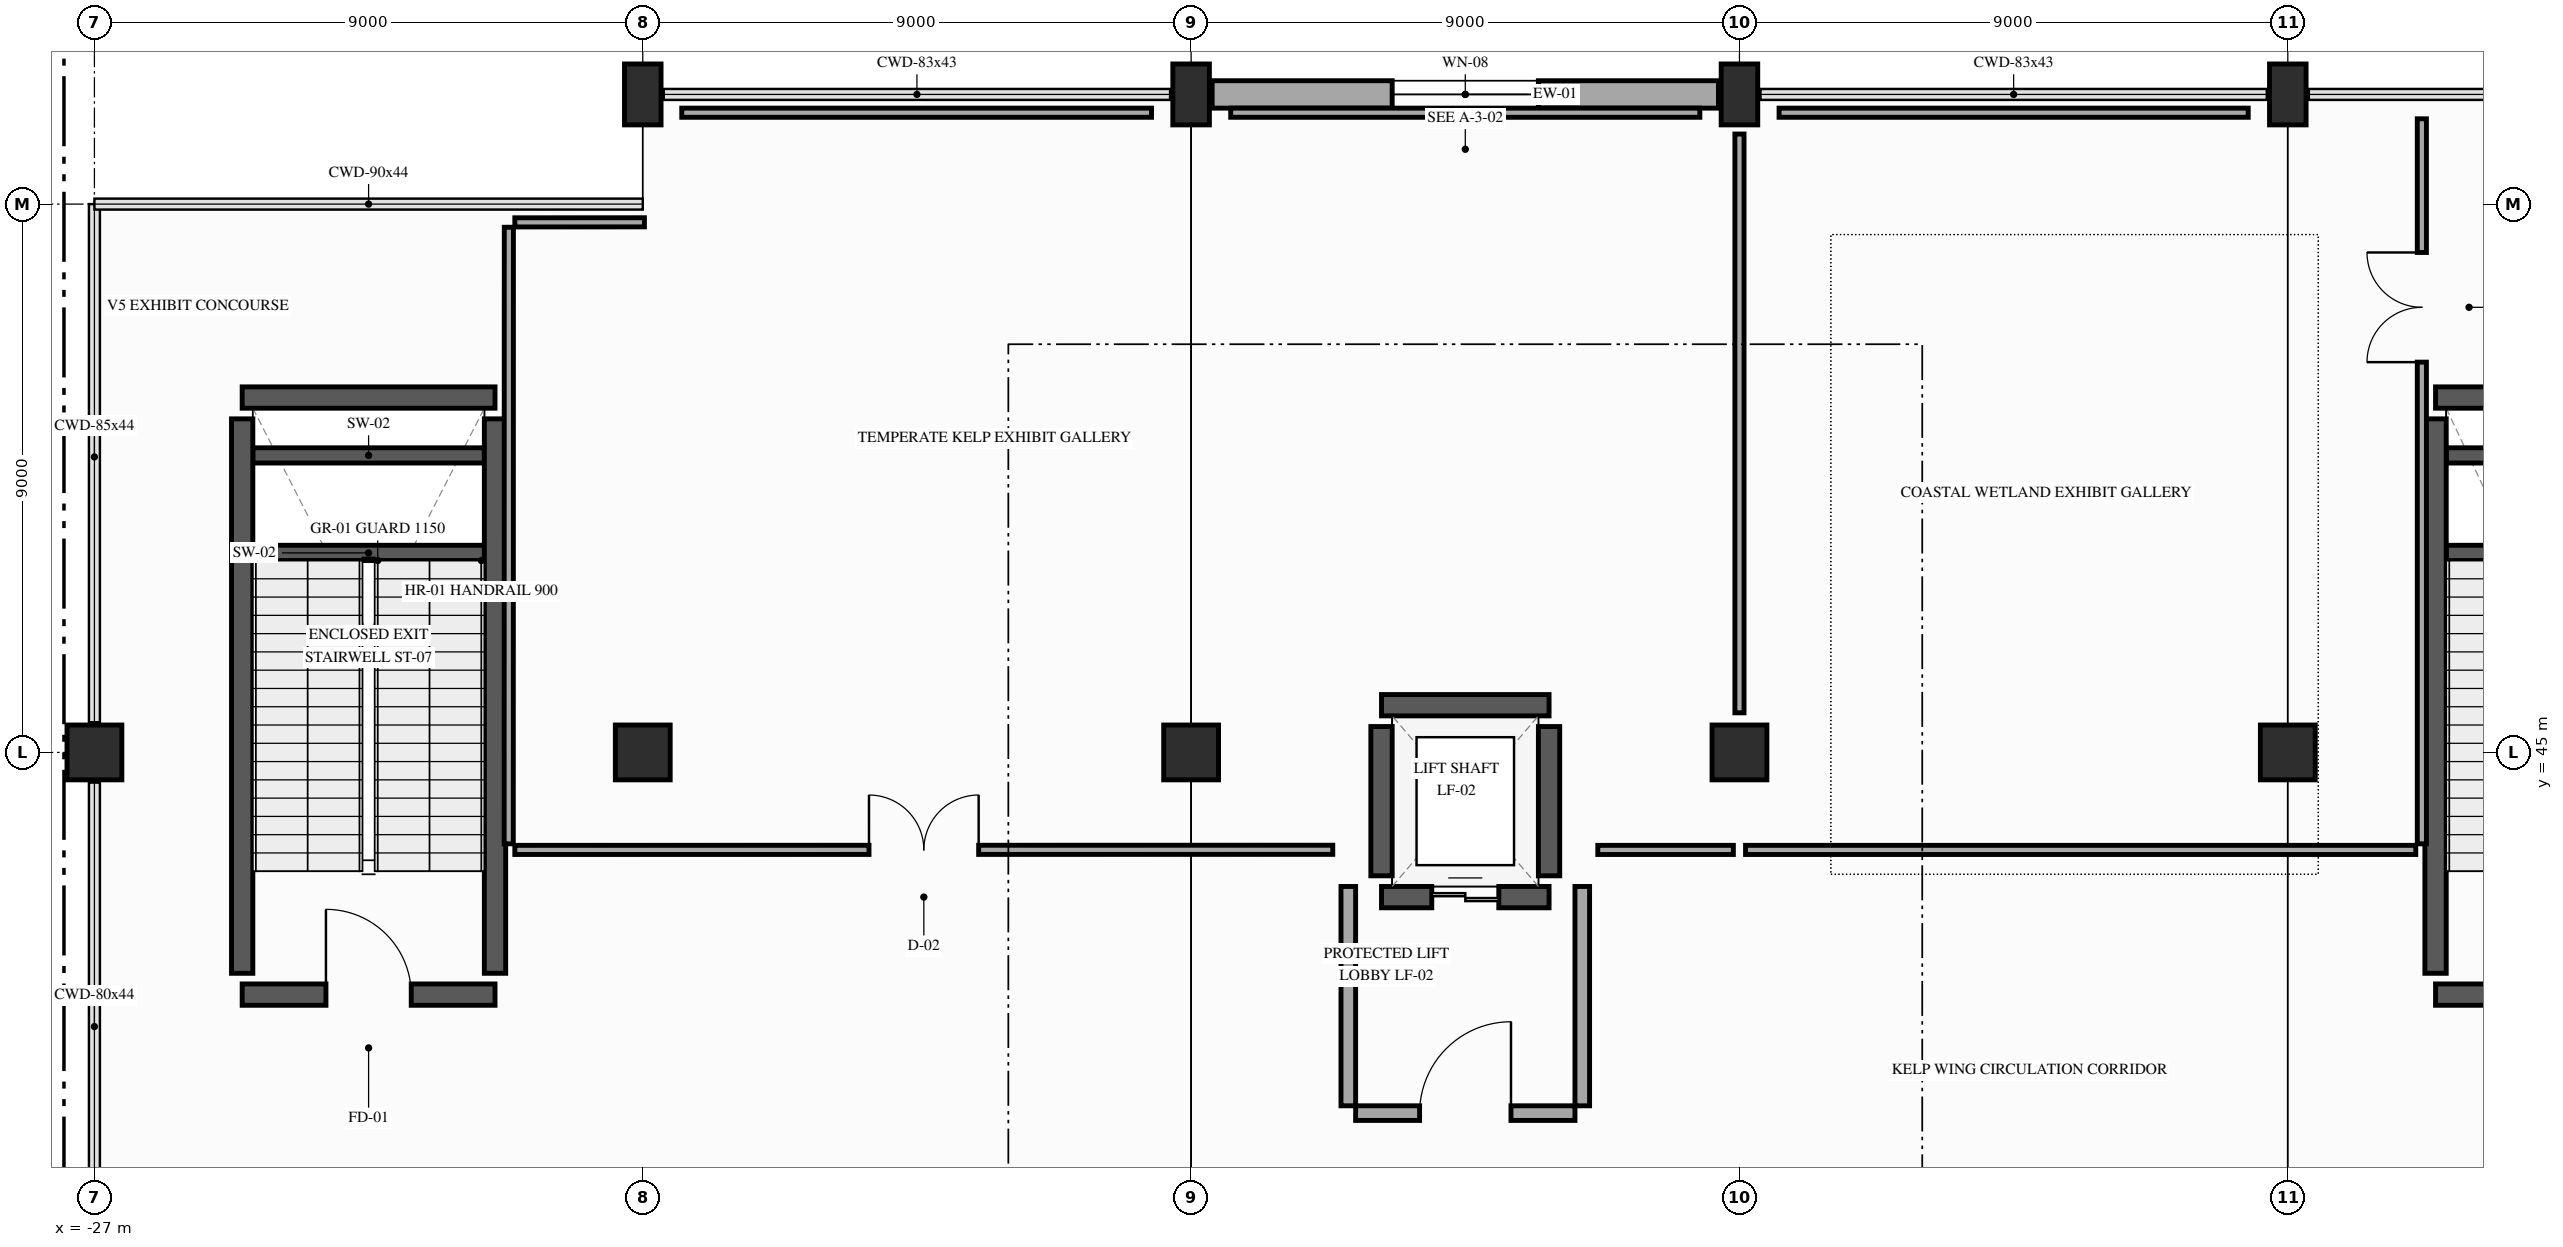
"""IFC4 building model, lengths in metres.
Left out: names, types, materials, properties, quantities, classifications, styles, units other than length and angle.
Written with IfcOpenShell. Run it as: python <this file> out.ifc"""

import sys

from ifc_helpers import new_model, si_unit, direction, frame, frame_2d, origin, origin_2d, place, context, subcontext, project, spatial, rectangle, extrude, element, fill, save


model = new_model("IFC4")
c1 = context("Model", 3, precision=1e-05, world=origin(), true_north=direction((0.0, 1.0)))
c2 = subcontext(c1, "Body", "Model", "MODEL_VIEW")
j1 = project(units=[si_unit("LENGTHUNIT", "METRE"), si_unit("PLANEANGLEUNIT", "RADIAN")], contexts=[c1])
p1 = place(None, origin())
s1 = spatial("IfcSite", under=j1, at=p1, CompositionType="ELEMENT")
p2 = place(p1, origin())
s2 = spatial("IfcBuilding", under=s1, at=p2, CompositionType="ELEMENT")
p3 = place(p2, frame((0.0, 0.0, 5.4)))
s3 = spatial("IfcBuildingStorey", under=s2, at=p3, CompositionType="ELEMENT", Elevation=5.4)
for number, where, z_axis, x_axis in (
    (1, (-27.0, 45.0, 0.0), (0.0, 0.0, 1.0), (1.0, 0.0, 0.0)),
    (2, (-18.0, 45.0, 0.0), (0.0, 0.0, 1.0), (1.0, 0.0, 0.0)),
):
    element("IfcColumn", number, at=place(p3, frame(where, z_axis=z_axis, x_axis=x_axis)), inside=s3, PredefinedType="COLUMN", context=c2, shape_type="SweptSolid", body=[
        extrude(rectangle(XDim=0.9, YDim=0.9, at=origin_2d()), origin(), (0.0, 0.0, 1.0), 5.4),
    ])
p4 = place(p3, frame((-18.0, 55.8, 0.0), z_axis=(0.0, 0.0, 1.0), x_axis=(1.0, 0.0, 0.0)))
e3 = element("IfcColumn", 3, at=p4, inside=s3, PredefinedType="PILASTER", context=c2, shape_type="SweptSolid", body=[
    extrude(rectangle(XDim=0.6, YDim=1.0, at=origin_2d()), origin(), (0.0, 0.0, 1.0), 5.4),
])
p5 = place(p3, frame((-9.0, 45.0, 0.0), z_axis=(0.0, 0.0, 1.0), x_axis=(1.0, 0.0, 0.0)))
e4 = element("IfcColumn", 4, at=p5, inside=s3, PredefinedType="COLUMN", context=c2, shape_type="SweptSolid", body=[
    extrude(rectangle(XDim=0.9, YDim=0.9, at=origin_2d()), origin(), (0.0, 0.0, 1.0), 5.4),
])
p6 = place(p3, frame((-9.0, 55.8, 0.0), z_axis=(0.0, 0.0, 1.0), x_axis=(1.0, 0.0, 0.0)))
e5 = element("IfcColumn", 5, at=p6, inside=s3, PredefinedType="PILASTER", context=c2, shape_type="SweptSolid", body=[
    extrude(rectangle(XDim=0.6, YDim=1.0, at=origin_2d()), origin(), (0.0, 0.0, 1.0), 5.4),
])
p7 = place(p3, frame((0.0, 45.0, 0.0), z_axis=(0.0, 0.0, 1.0), x_axis=(1.0, 0.0, 0.0)))
e6 = element("IfcColumn", 6, at=p7, inside=s3, PredefinedType="COLUMN", context=c2, shape_type="SweptSolid", body=[
    extrude(rectangle(XDim=0.9, YDim=0.9, at=origin_2d()), origin(), (0.0, 0.0, 1.0), 5.4),
])
p8 = place(p3, frame((0.0, 55.8, 0.0), z_axis=(0.0, 0.0, 1.0), x_axis=(1.0, 0.0, 0.0)))
e7 = element("IfcColumn", 7, at=p8, inside=s3, PredefinedType="PILASTER", context=c2, shape_type="SweptSolid", body=[
    extrude(rectangle(XDim=0.6, YDim=1.0, at=origin_2d()), origin(), (0.0, 0.0, 1.0), 5.4),
])
p9 = place(p3, frame((9.0, 45.0, 0.0), z_axis=(0.0, 0.0, 1.0), x_axis=(1.0, 0.0, 0.0)))
e8 = element("IfcColumn", 8, at=p9, inside=s3, PredefinedType="COLUMN", context=c2, shape_type="SweptSolid", body=[
    extrude(rectangle(XDim=0.9, YDim=0.9, at=origin_2d()), origin(), (0.0, 0.0, 1.0), 5.4),
])
p10 = place(p3, frame((9.0, 55.8, 0.0), z_axis=(0.0, 0.0, 1.0), x_axis=(1.0, 0.0, 0.0)))
e9 = element("IfcColumn", 9, at=p10, inside=s3, PredefinedType="PILASTER", context=c2, shape_type="SweptSolid", body=[
    extrude(rectangle(XDim=0.6, YDim=1.0, at=origin_2d()), origin(), (0.0, 0.0, 1.0), 5.4),
])
p11 = place(p3, frame((-8.655, 55.8, 0.0), z_axis=(0.0, 0.0, 1.0), x_axis=(1.0, 0.0, 0.0)))
e10 = element("IfcWall", 10, at=p11, inside=s3, PredefinedType="SOLIDWALL", context=c2, shape_type="SweptSolid", body=[
    extrude(rectangle(XDim=8.31, YDim=0.45, at=frame_2d((4.155, 0.0))), origin(), (0.0, 0.0, 1.0), 4.375),
])
p12 = place(p11, frame((2.955, 0.0, 0.9)))
e11 = element("IfcOpeningElement", 11, at=p12, cuts=e10, PredefinedType="OPENING", context=c2, shape_type="SweptSolid", body=[
    extrude(rectangle(XDim=2.4, YDim=2.4, at=frame_2d((1.2, 1.2))), frame((0.0, 0.235, 0.0), z_axis=(0.0, -1.0, 0.0), x_axis=(1.0, 0.0, 0.0)), (0.0, 0.0, 1.0), 0.47),
])
for number, where, z_axis, x_axis in (
    (12, (-24.4, 48.275, 0.0), (0.0, 0.0, 1.0), (1.0, 0.0, 0.0)),
    (13, (-24.4, 49.875, 0.0), (0.0, 0.0, 1.0), (1.0, 0.0, 0.0)),
):
    element("IfcWall", number, at=place(p3, frame(where, z_axis=z_axis, x_axis=x_axis)), inside=s3, PredefinedType="SHEAR", context=c2, shape_type="SweptSolid", body=[
        extrude(rectangle(XDim=3.8, YDim=0.25, at=frame_2d((1.9, 0.0))), origin(), (0.0, 0.0, 1.0), 2.5),
    ])
p13 = place(p3, frame((-24.575, 41.025, 0.0), z_axis=(0.0, 0.0, 1.0), x_axis=(1.0, 0.0, 0.0)))
e14 = element("IfcWall", 14, at=p13, inside=s3, PredefinedType="SHEAR", context=c2, shape_type="SweptSolid", body=[
    extrude(rectangle(XDim=4.15, YDim=0.35, at=frame_2d((2.075, 0.0))), origin(), (0.0, 0.0, 1.0), 5.15),
])
p14 = place(p13, frame((1.375, 0.0, 0.0)))
e15 = element("IfcOpeningElement", 15, at=p14, cuts=e14, PredefinedType="OPENING", context=c2, shape_type="SweptSolid", body=[
    extrude(rectangle(XDim=1.4, YDim=2.2, at=frame_2d((0.7, 1.1))), frame((0.0, 0.185, 0.0), z_axis=(0.0, -1.0, 0.0), x_axis=(1.0, 0.0, 0.0)), (0.0, 0.0, 1.0), 0.37),
])
p15 = place(p3, frame((-24.575, 50.825, 0.0), z_axis=(0.0, 0.0, 1.0), x_axis=(1.0, 0.0, 0.0)))
e16 = element("IfcWall", 16, at=p15, inside=s3, PredefinedType="SHEAR", context=c2, shape_type="SweptSolid", body=[
    extrude(rectangle(XDim=4.15, YDim=0.35, at=frame_2d((2.075, 0.0))), origin(), (0.0, 0.0, 1.0), 5.15),
])
for number, where, z_axis, x_axis in (
    (17, (-24.575, 41.375, 0.0), (0.0, 0.0, 1.0), (0.0, 1.0, 0.0)),
    (18, (-20.425, 41.375, 0.0), (0.0, 0.0, 1.0), (0.0, 1.0, 0.0)),
):
    element("IfcWall", number, at=place(p3, frame(where, z_axis=z_axis, x_axis=x_axis)), inside=s3, PredefinedType="SHEAR", context=c2, shape_type="SweptSolid", body=[
        extrude(rectangle(XDim=9.1, YDim=0.35, at=frame_2d((4.55, 0.0))), origin(), (0.0, 0.0, 1.0), 5.15),
    ])
for number, where, z_axis, x_axis in (
    (19, (11.6, 48.275, 0.0), (0.0, 0.0, 1.0), (1.0, 0.0, 0.0)),
    (20, (11.6, 49.875, 0.0), (0.0, 0.0, 1.0), (1.0, 0.0, 0.0)),
):
    element("IfcWall", number, at=place(p3, frame(where, z_axis=z_axis, x_axis=x_axis)), inside=s3, PredefinedType="SHEAR", context=c2, shape_type="SweptSolid", body=[
        extrude(rectangle(XDim=3.5, YDim=0.25, at=frame_2d((1.75, 0.0))), origin(), (0.0, 0.0, 1.0), 2.5),
    ])
p16 = place(p3, frame((11.425, 41.025, 0.0), z_axis=(0.0, 0.0, 1.0), x_axis=(1.0, 0.0, 0.0)))
e21 = element("IfcWall", 21, at=p16, inside=s3, PredefinedType="SHEAR", context=c2, shape_type="SweptSolid", body=[
    extrude(rectangle(XDim=3.85, YDim=0.35, at=frame_2d((1.925, 0.0))), origin(), (0.0, 0.0, 1.0), 5.15),
])
p17 = place(p16, frame((1.275, 0.0, 0.0)))
e22 = element("IfcOpeningElement", 22, at=p17, cuts=e21, PredefinedType="OPENING", context=c2, shape_type="SweptSolid", body=[
    extrude(rectangle(XDim=1.3, YDim=2.2, at=frame_2d((0.65, 1.1))), frame((0.0, 0.185, 0.0), z_axis=(0.0, -1.0, 0.0), x_axis=(1.0, 0.0, 0.0)), (0.0, 0.0, 1.0), 0.37),
])
p18 = place(p3, frame((11.425, 50.825, 0.0), z_axis=(0.0, 0.0, 1.0), x_axis=(1.0, 0.0, 0.0)))
e23 = element("IfcWall", 23, at=p18, inside=s3, PredefinedType="SHEAR", context=c2, shape_type="SweptSolid", body=[
    extrude(rectangle(XDim=3.85, YDim=0.35, at=frame_2d((1.925, 0.0))), origin(), (0.0, 0.0, 1.0), 5.15),
])
p19 = place(p3, frame((11.425, 41.375, 0.0), z_axis=(0.0, 0.0, 1.0), x_axis=(0.0, 1.0, 0.0)))
e24 = element("IfcWall", 24, at=p19, inside=s3, PredefinedType="SHEAR", context=c2, shape_type="SweptSolid", body=[
    extrude(rectangle(XDim=9.1, YDim=0.35, at=frame_2d((4.55, 0.0))), origin(), (0.0, 0.0, 1.0), 5.15),
])
p20 = place(p3, frame((-5.875, 42.625, 0.0), z_axis=(0.0, 0.0, 1.0), x_axis=(1.0, 0.0, 0.0)))
e25 = element("IfcWall", 25, at=p20, inside=s3, PredefinedType="SHEAR", context=c2, shape_type="SweptSolid", body=[
    extrude(rectangle(XDim=2.75, YDim=0.35, at=frame_2d((1.375, 0.0))), origin(), (0.0, 0.0, 1.0), 5.15),
])
p21 = place(p20, frame((0.825, 0.0, 0.0)))
e26 = element("IfcOpeningElement", 26, at=p21, cuts=e25, PredefinedType="OPENING", context=c2, shape_type="SweptSolid", body=[
    extrude(rectangle(XDim=1.1, YDim=2.2, at=frame_2d((0.55, 1.1))), frame((0.0, 0.185, 0.0), z_axis=(0.0, -1.0, 0.0), x_axis=(1.0, 0.0, 0.0)), (0.0, 0.0, 1.0), 0.37),
])
p22 = place(p3, frame((-3.125, 45.775, 0.0), z_axis=(0.0, 0.0, 1.0), x_axis=(-1.0, 0.0, 0.0)))
e27 = element("IfcWall", 27, at=p22, inside=s3, PredefinedType="SHEAR", context=c2, shape_type="SweptSolid", body=[
    extrude(rectangle(XDim=2.75, YDim=0.35, at=frame_2d((1.375, 0.0))), origin(), (0.0, 0.0, 1.0), 5.15),
])
for number, where, z_axis, x_axis in (
    (28, (-5.875, 42.975, 0.0), (0.0, 0.0, 1.0), (0.0, 1.0, 0.0)),
    (29, (-3.125, 42.975, 0.0), (0.0, 0.0, 1.0), (0.0, 1.0, 0.0)),
):
    element("IfcWall", number, at=place(p3, frame(where, z_axis=z_axis, x_axis=x_axis)), inside=s3, PredefinedType="SHEAR", context=c2, shape_type="SweptSolid", body=[
        extrude(rectangle(XDim=2.45, YDim=0.35, at=frame_2d((1.225, 0.0))), origin(), (0.0, 0.0, 1.0), 5.15),
    ])
p23 = place(p3, frame((-6.3, 39.08, 0.0), z_axis=(0.0, 0.0, 1.0), x_axis=(1.0, 0.0, 0.0)))
e30 = element("IfcWall", 30, at=p23, inside=s3, PredefinedType="PARTITIONING", context=c2, shape_type="SweptSolid", body=[
    extrude(rectangle(XDim=3.6, YDim=0.24, at=frame_2d((1.8, 0.0))), origin(), (0.0, 0.0, 1.0), 4.725),
])
p24 = place(p23, frame((1.05, 0.0, 0.0)))
e31 = element("IfcOpeningElement", 31, at=p24, cuts=e30, PredefinedType="OPENING", context=c2, shape_type="SweptSolid", body=[
    extrude(rectangle(XDim=1.5, YDim=2.2, at=frame_2d((0.75, 1.1))), frame((0.0, 0.13, 0.0), z_axis=(0.0, -1.0, 0.0), x_axis=(1.0, 0.0, 0.0)), (0.0, 0.0, 1.0), 0.26),
])
for number, where, z_axis, x_axis in (
    (32, (-6.42, 39.2, 0.0), (0.0, 0.0, 1.0), (0.0, 1.0, 0.0)),
    (33, (-2.58, 39.2, 0.0), (0.0, 0.0, 1.0), (0.0, 1.0, 0.0)),
):
    element("IfcWall", number, at=place(p3, frame(where, z_axis=z_axis, x_axis=x_axis)), inside=s3, PredefinedType="PARTITIONING", context=c2, shape_type="SweptSolid", body=[
        extrude(rectangle(XDim=3.6, YDim=0.24, at=frame_2d((1.8, 0.0))), origin(), (0.0, 0.0, 1.0), 4.725),
    ])
p25 = place(p3, frame((-20.198, 53.62, 0.0), z_axis=(0.0, 0.0, 1.0), x_axis=(-0.000192994303, -0.999999981377, 0.0)))
e34 = element("IfcWall", 34, at=p25, inside=s3, PredefinedType="PARTITIONING", context=c2, shape_type="SweptSolid", body=[
    extrude(rectangle(XDim=10.12, YDim=0.15, at=frame_2d((5.06, 0.0))), origin(), (0.0, 0.0, 1.0), 5.05),
])
p26 = place(p3, frame((-20.1, 43.4, 0.0), z_axis=(0.0, 0.0, 1.0), x_axis=(0.999999986606, 0.000163669095, 0.0)))
e35 = element("IfcWall", 35, at=p26, inside=s3, PredefinedType="PARTITIONING", context=c2, shape_type="SweptSolid", body=[
    extrude(rectangle(XDim=13.425, YDim=0.15, at=frame_2d((6.712, 0.0))), origin(), (0.0, 0.0, 1.0), 4.425),
])
p27 = place(p26, frame((5.813, 0.0, 0.0)))
e36 = element("IfcOpeningElement", 36, at=p27, cuts=e35, PredefinedType="OPENING", context=c2, shape_type="SweptSolid", body=[
    extrude(rectangle(XDim=1.8, YDim=2.3, at=frame_2d((0.9, 1.15))), frame((0.0, 0.085, 0.0), z_axis=(0.0, -1.0, 0.0), x_axis=(1.0, 0.0, 0.0)), (0.0, 0.0, 1.0), 0.17),
])
p28 = place(p3, frame((-2.325, 43.4, 0.0), z_axis=(0.0, 0.0, 1.0), x_axis=(1.0, 0.0, 0.0)))
e37 = element("IfcWall", 37, at=p28, inside=s3, PredefinedType="PARTITIONING", context=c2, shape_type="SweptSolid", body=[
    extrude(rectangle(XDim=2.225, YDim=0.15, at=frame_2d((1.112, 0.0))), origin(), (0.0, 0.0, 1.0), 4.425),
])
p29 = place(p3, frame((0.0, 45.65, 0.0), z_axis=(0.0, 0.0, 1.0), x_axis=(0.0, 1.0, 0.0)))
e38 = element("IfcWall", 38, at=p29, inside=s3, PredefinedType="PARTITIONING", context=c2, shape_type="SweptSolid", body=[
    extrude(rectangle(XDim=9.5, YDim=0.15, at=frame_2d((4.75, 0.0))), origin(), (0.0, 0.0, 1.0), 4.425),
])
p30 = place(p3, frame((-0.65, 55.5, 0.0), z_axis=(0.0, 0.0, 1.0), x_axis=(-1.0, 0.0, 0.0)))
e39 = element("IfcWall", 39, at=p30, inside=s3, PredefinedType="PARTITIONING", context=c2, shape_type="SweptSolid", body=[
    extrude(rectangle(XDim=7.7, YDim=0.15, at=frame_2d((3.85, 0.0))), origin(), (0.0, 0.0, 1.0), 4.375),
])
p31 = place(p3, frame((-9.65, 55.5, 0.0), z_axis=(0.0, 0.0, 1.0), x_axis=(-1.0, 0.0, 0.0)))
e40 = element("IfcWall", 40, at=p31, inside=s3, PredefinedType="PARTITIONING", context=c2, shape_type="SweptSolid", body=[
    extrude(rectangle(XDim=7.71, YDim=0.15, at=frame_2d((3.855, 0.0))), origin(), (0.0, 0.0, 1.0), 4.375),
])
p32 = place(p3, frame((-17.973, 53.701, 0.0), z_axis=(0.0, 0.0, 1.0), x_axis=(-0.999999894621, -0.000459084079, 0.0)))
e41 = element("IfcWall", 41, at=p32, inside=s3, PredefinedType="PARTITIONING", context=c2, shape_type="SweptSolid", body=[
    extrude(rectangle(XDim=2.127, YDim=0.15, at=frame_2d((1.063, 0.0))), origin(), (0.0, 0.0, 1.0), 4.425),
])
p33 = place(p3, frame((0.1, 43.4, 0.0), z_axis=(0.0, 0.0, 1.0), x_axis=(1.0, 0.0, 0.0)))
e42 = element("IfcWall", 42, at=p33, inside=s3, PredefinedType="PARTITIONING", context=c2, shape_type="SweptSolid", body=[
    extrude(rectangle(XDim=11.0, YDim=0.15, at=frame_2d((5.5, 0.0))), origin(), (0.0, 0.0, 1.0), 4.425),
])
p34 = place(p3, frame((11.2, 43.5, 0.0), z_axis=(0.0, 0.0, 1.0), x_axis=(0.0, 1.0, 0.0)))
e43 = element("IfcWall", 43, at=p34, inside=s3, PredefinedType="PARTITIONING", context=c2, shape_type="SweptSolid", body=[
    extrude(rectangle(XDim=11.9, YDim=0.15, at=frame_2d((5.95, 0.0))), origin(), (0.0, 0.0, 1.0), 4.375),
])
p35 = place(p34, frame((7.906, 0.0, 0.0)))
e44 = element("IfcOpeningElement", 44, at=p35, cuts=e43, PredefinedType="OPENING", context=c2, shape_type="SweptSolid", body=[
    extrude(rectangle(XDim=1.8, YDim=2.3, at=frame_2d((0.9, 1.15))), frame((0.0, 0.085, 0.0), z_axis=(0.0, -1.0, 0.0), x_axis=(1.0, 0.0, 0.0)), (0.0, 0.0, 1.0), 0.17),
])
p36 = place(p3, frame((8.35, 55.5, 0.0), z_axis=(0.0, 0.0, 1.0), x_axis=(-1.0, 0.0, 0.0)))
e45 = element("IfcWall", 45, at=p36, inside=s3, PredefinedType="PARTITIONING", context=c2, shape_type="SweptSolid", body=[
    extrude(rectangle(XDim=7.7, YDim=0.15, at=frame_2d((3.85, 0.0))), origin(), (0.0, 0.0, 1.0), 4.375),
])
p37 = place(p12, origin())
e46 = element("IfcWindow", 46, at=p37, inside=s3, PartitioningType="SINGLE_PANEL", PredefinedType="WINDOW", context=c2, shape_type="SweptSolid", body=[
    extrude(rectangle(XDim=2.4, YDim=2.4, at=frame_2d((1.2, 1.2))), frame((0.0, 0.03, 0.0), z_axis=(0.0, -1.0, 0.0), x_axis=(1.0, 0.0, 0.0)), (0.0, 0.0, 1.0), 0.06),
])
fill(e11, e46)
p38 = place(p14, origin())
e47 = element("IfcDoor", 47, at=p38, inside=s3, OperationType="SINGLE_SWING_LEFT", PredefinedType="DOOR", context=c2, shape_type="SweptSolid", body=[
    extrude(rectangle(XDim=1.4, YDim=2.2, at=frame_2d((0.7, 1.1))), frame((0.0, 0.025, 0.0), z_axis=(0.0, -1.0, 0.0), x_axis=(1.0, 0.0, 0.0)), (0.0, 0.0, 1.0), 0.05),
])
fill(e15, e47)
p39 = place(p21, origin())
e48 = element("IfcDoor", 48, at=p39, inside=s3, OperationType="DOUBLE_DOOR_SLIDING", PredefinedType="DOOR", context=c2, shape_type="SweptSolid", body=[
    extrude(rectangle(XDim=1.1, YDim=2.2, at=frame_2d((0.55, 1.1))), frame((0.0, 0.025, 0.0), z_axis=(0.0, -1.0, 0.0), x_axis=(1.0, 0.0, 0.0)), (0.0, 0.0, 1.0), 0.05),
])
fill(e26, e48)
p40 = place(p24, origin())
e49 = element("IfcDoor", 49, at=p40, inside=s3, OperationType="SINGLE_SWING_RIGHT", PredefinedType="DOOR", context=c2, shape_type="SweptSolid", body=[
    extrude(rectangle(XDim=1.5, YDim=2.2, at=frame_2d((0.75, 1.1))), frame((0.0, 0.025, 0.0), z_axis=(0.0, -1.0, 0.0), x_axis=(1.0, 0.0, 0.0)), (0.0, 0.0, 1.0), 0.05),
])
fill(e31, e49)
p41 = place(p27, origin())
e50 = element("IfcDoor", 50, at=p41, inside=s3, OperationType="DOUBLE_DOOR_SINGLE_SWING", PredefinedType="DOOR", context=c2, shape_type="SweptSolid", body=[
    extrude(rectangle(XDim=1.8, YDim=2.3, at=frame_2d((0.9, 1.15))), frame((0.0, 0.025, 0.0), z_axis=(0.0, -1.0, 0.0), x_axis=(1.0, 0.0, 0.0)), (0.0, 0.0, 1.0), 0.05),
])
fill(e36, e50)
p42 = place(p35, origin())
e51 = element("IfcDoor", 51, at=p42, inside=s3, OperationType="DOUBLE_DOOR_SINGLE_SWING", PredefinedType="DOOR", context=c2, shape_type="SweptSolid", body=[
    extrude(rectangle(XDim=1.8, YDim=2.3, at=frame_2d((0.9, 1.15))), frame((0.0, 0.025, 0.0), z_axis=(0.0, -1.0, 0.0), x_axis=(1.0, 0.0, 0.0)), (0.0, 0.0, 1.0), 0.05),
])
fill(e44, e51)
save(model, sys.argv[1])
